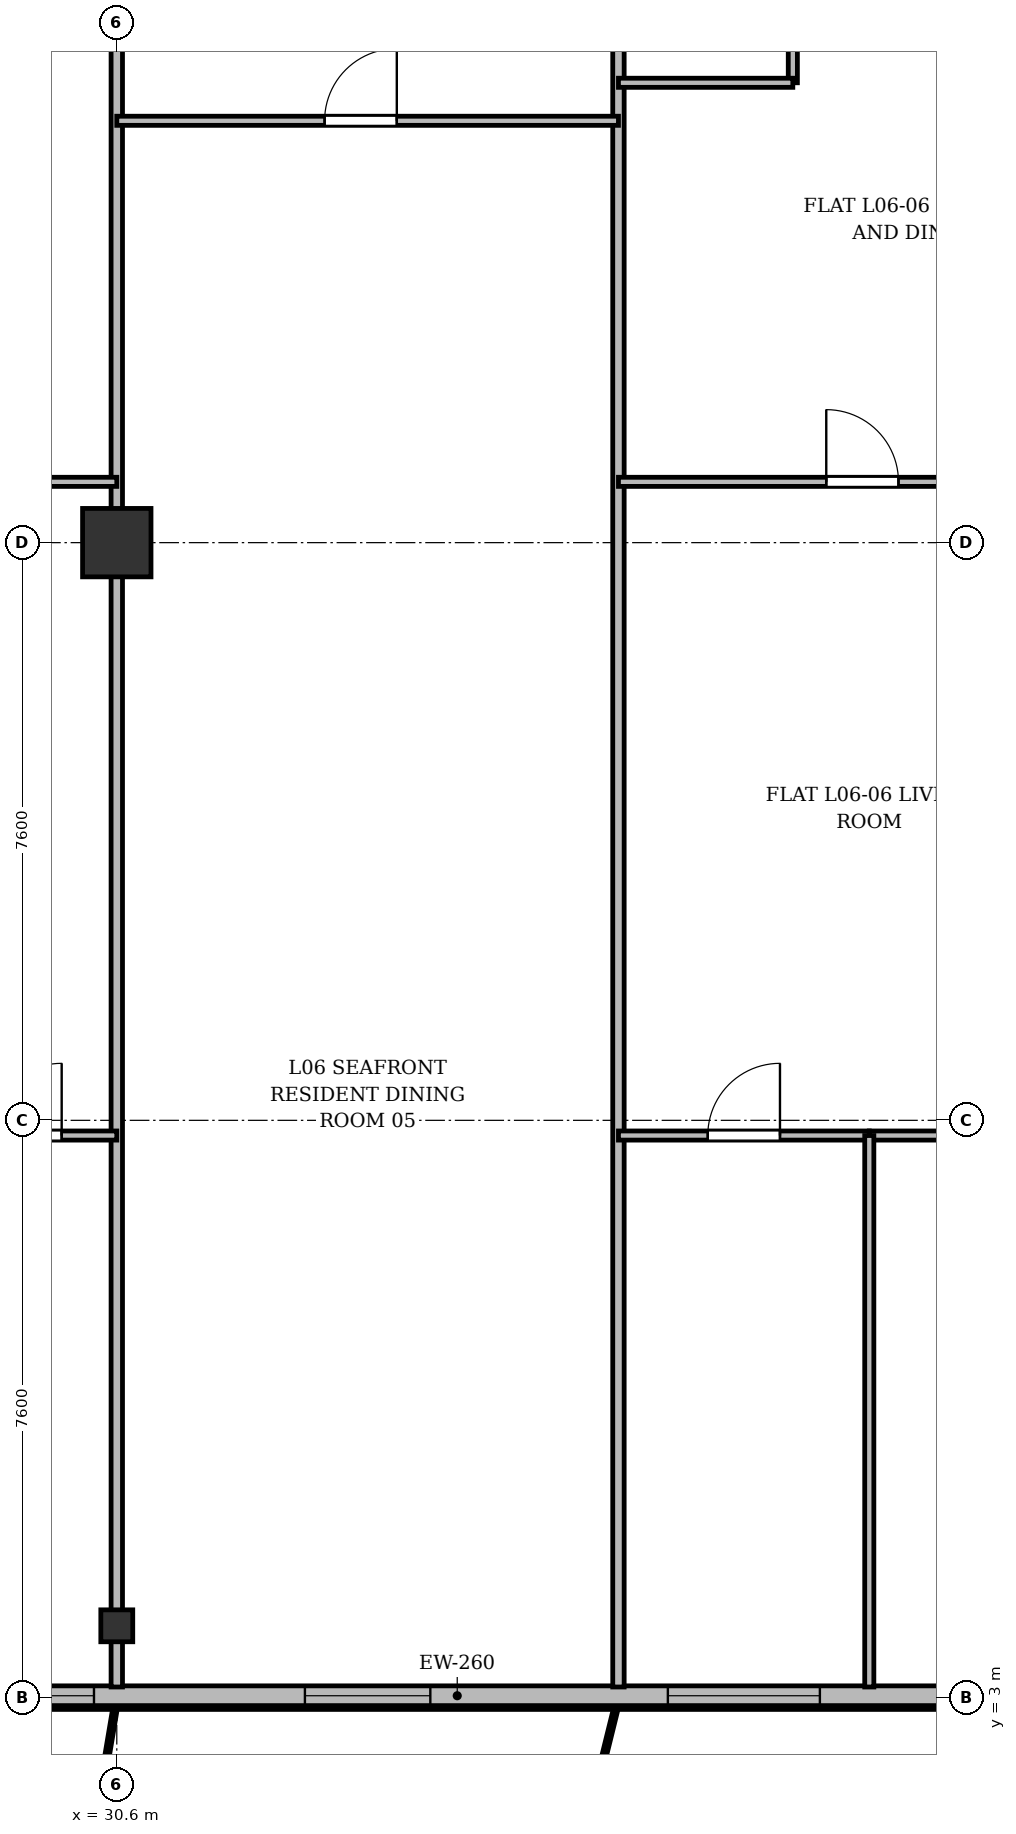
"""IFC4 building model, lengths in metres.
Left out: names, types, materials, properties, quantities, classifications, styles, units other than length and angle.
Written with IfcOpenShell. Run it as: python <this file> out.ifc"""

import sys

from ifc_helpers import new_model, si_unit, direction, frame, frame_2d, origin, origin_2d, place, context, subcontext, project, spatial, rectangle, i_section, extrude, source, transform, mapped, element, fill, save


model = new_model("IFC4")
c1 = context("Model", 3, precision=1e-05, world=origin(), true_north=direction((0.0, 1.0)))
c2 = subcontext(c1, "Body", "Model", "MODEL_VIEW")
j1 = project(units=[si_unit("LENGTHUNIT", "METRE"), si_unit("PLANEANGLEUNIT", "RADIAN")], contexts=[c1])
p1 = place(None, origin())
s1 = spatial("IfcSite", under=j1, at=p1, CompositionType="ELEMENT")
p2 = place(p1, origin())
s2 = spatial("IfcBuilding", under=s1, at=p2, CompositionType="ELEMENT")
p3 = place(p2, frame((0.0, 0.0, 27.1)))
s3 = spatial("IfcBuildingStorey", under=s2, at=p3, CompositionType="ELEMENT", Elevation=27.1)
m1 = source(origin(), c2, "Body", "SweptSolid", [
    extrude(i_section(OverallWidth=0.42, OverallDepth=0.42, WebThickness=0.026, FlangeThickness=0.04, at=origin_2d()), origin(), (0.0, 0.0, 1.0), 3.6),
])
p4 = place(p3, frame((30.6, 3.95, 0.0), z_axis=(0.0, 0.0, 1.0), x_axis=(1.0, 0.0, 0.0)))
e1 = element("IfcColumn", 1, at=p4, inside=s3, PredefinedType="COLUMN", context=c2, shape_type="MappedRepresentation", body=[
    mapped(m1, transform((0.0, 0.0, 0.0), x_axis=(1.0, 0.0, 0.0), y_axis=(0.0, 1.0, 0.0), z_axis=(0.0, 0.0, 1.0), scale=1.0)),
])
m2 = source(origin(), c2, "Body", "SweptSolid", [
    extrude(rectangle(XDim=0.9, YDim=0.9, at=origin_2d()), origin(), (0.0, 0.0, 1.0), 3.6),
])
p5 = place(p3, frame((30.6, 18.2, 0.0), z_axis=(0.0, 0.0, 1.0), x_axis=(1.0, 0.0, 0.0)))
e2 = element("IfcColumn", 2, at=p5, inside=s3, PredefinedType="COLUMN", context=c2, shape_type="MappedRepresentation", body=[
    mapped(m2, transform((0.0, 0.0, 0.0), x_axis=(1.0, 0.0, 0.0), y_axis=(0.0, 1.0, 0.0), z_axis=(0.0, 0.0, 1.0), scale=1.0)),
])
p6 = place(p3, frame((66.9, 3.03, 0.0), z_axis=(0.0, 0.0, 1.0), x_axis=(-1.0, 0.0, 0.0)))
e3 = element("IfcWall", 3, at=p6, inside=s3, PredefinedType="SOLIDWALL", context=c2, shape_type="SweptSolid", body=[
    extrude(rectangle(XDim=59.4, YDim=0.26, at=frame_2d((29.7, 0.0))), origin(), (0.0, 0.0, 1.0), 3.34),
])
p7 = place(p6, frame((3.95, 0.0, 0.9)))
e4 = element("IfcOpeningElement", 4, at=p7, cuts=e3, PredefinedType="OPENING", context=c2, shape_type="SweptSolid", body=[
    extrude(rectangle(XDim=1.5, YDim=1.75, at=frame_2d((0.75, 0.875))), frame((0.0, 0.14, 0.0), z_axis=(0.0, -1.0, 0.0), x_axis=(1.0, 0.0, 0.0)), (0.0, 0.0, 1.0), 0.28),
])
p8 = place(p6, frame((9.05, 0.0, 0.9)))
e5 = element("IfcOpeningElement", 5, at=p8, cuts=e3, PredefinedType="OPENING", context=c2, shape_type="SweptSolid", body=[
    extrude(rectangle(XDim=2.0, YDim=1.95, at=frame_2d((1.0, 0.975))), frame((0.0, 0.14, 0.0), z_axis=(0.0, -1.0, 0.0), x_axis=(1.0, 0.0, 0.0)), (0.0, 0.0, 1.0), 0.28),
])
p9 = place(p6, frame((13.125, 0.0, 0.9)))
e6 = element("IfcOpeningElement", 6, at=p9, cuts=e3, PredefinedType="OPENING", context=c2, shape_type="SweptSolid", body=[
    extrude(rectangle(XDim=1.65, YDim=1.85, at=frame_2d((0.825, 0.925))), frame((0.0, 0.14, 0.0), z_axis=(0.0, -1.0, 0.0), x_axis=(1.0, 0.0, 0.0)), (0.0, 0.0, 1.0), 0.28),
])
p10 = place(p6, frame((17.007, 0.0, 0.0)))
e7 = element("IfcOpeningElement", 7, at=p10, cuts=e3, PredefinedType="OPENING", context=c2, shape_type="SweptSolid", body=[
    extrude(rectangle(XDim=1.2, YDim=2.2, at=frame_2d((0.6, 1.1))), frame((0.0, 0.14, 0.0), z_axis=(0.0, -1.0, 0.0), x_axis=(1.0, 0.0, 0.0)), (0.0, 0.0, 1.0), 0.28),
])
p11 = place(p6, frame((20.2, 0.0, 0.9)))
e8 = element("IfcOpeningElement", 8, at=p11, cuts=e3, PredefinedType="OPENING", context=c2, shape_type="SweptSolid", body=[
    extrude(rectangle(XDim=2.2, YDim=1.8, at=frame_2d((1.1, 0.9))), frame((0.0, 0.14, 0.0), z_axis=(0.0, -1.0, 0.0), x_axis=(1.0, 0.0, 0.0)), (0.0, 0.0, 1.0), 0.28),
])
p12 = place(p6, frame((24.0, 0.0, 0.9)))
e9 = element("IfcOpeningElement", 9, at=p12, cuts=e3, PredefinedType="OPENING", context=c2, shape_type="SweptSolid", body=[
    extrude(rectangle(XDim=1.5, YDim=1.75, at=frame_2d((0.75, 0.875))), frame((0.0, 0.14, 0.0), z_axis=(0.0, -1.0, 0.0), x_axis=(1.0, 0.0, 0.0)), (0.0, 0.0, 1.0), 0.28),
])
p13 = place(p6, frame((27.05, 0.0, 0.9)))
e10 = element("IfcOpeningElement", 10, at=p13, cuts=e3, PredefinedType="OPENING", context=c2, shape_type="SweptSolid", body=[
    extrude(rectangle(XDim=2.0, YDim=1.95, at=frame_2d((1.0, 0.975))), frame((0.0, 0.14, 0.0), z_axis=(0.0, -1.0, 0.0), x_axis=(1.0, 0.0, 0.0)), (0.0, 0.0, 1.0), 0.28),
])
p14 = place(p6, frame((32.175, 0.0, 0.9)))
e11 = element("IfcOpeningElement", 11, at=p14, cuts=e3, PredefinedType="OPENING", context=c2, shape_type="SweptSolid", body=[
    extrude(rectangle(XDim=1.65, YDim=1.85, at=frame_2d((0.825, 0.925))), frame((0.0, 0.14, 0.0), z_axis=(0.0, -1.0, 0.0), x_axis=(1.0, 0.0, 0.0)), (0.0, 0.0, 1.0), 0.28),
])
p15 = place(p6, frame((36.6, 0.0, 0.9)))
e12 = element("IfcOpeningElement", 12, at=p15, cuts=e3, PredefinedType="OPENING", context=c2, shape_type="SweptSolid", body=[
    extrude(rectangle(XDim=1.8, YDim=1.8, at=frame_2d((0.9, 0.9))), frame((0.0, 0.14, 0.0), z_axis=(0.0, -1.0, 0.0), x_axis=(1.0, 0.0, 0.0)), (0.0, 0.0, 1.0), 0.28),
])
p16 = place(p6, frame((39.15, 0.0, 0.9)))
e13 = element("IfcOpeningElement", 13, at=p16, cuts=e3, PredefinedType="OPENING", context=c2, shape_type="SweptSolid", body=[
    extrude(rectangle(XDim=1.5, YDim=1.75, at=frame_2d((0.75, 0.875))), frame((0.0, 0.14, 0.0), z_axis=(0.0, -1.0, 0.0), x_axis=(1.0, 0.0, 0.0)), (0.0, 0.0, 1.0), 0.28),
])
p17 = place(p6, frame((41.55, 0.0, 0.9)))
e14 = element("IfcOpeningElement", 14, at=p17, cuts=e3, PredefinedType="OPENING", context=c2, shape_type="SweptSolid", body=[
    extrude(rectangle(XDim=1.5, YDim=1.75, at=frame_2d((0.75, 0.875))), frame((0.0, 0.14, 0.0), z_axis=(0.0, -1.0, 0.0), x_axis=(1.0, 0.0, 0.0)), (0.0, 0.0, 1.0), 0.28),
])
p18 = place(p6, frame((45.435, 0.0, 0.0)))
e15 = element("IfcOpeningElement", 15, at=p18, cuts=e3, PredefinedType="OPENING", context=c2, shape_type="SweptSolid", body=[
    extrude(rectangle(XDim=1.2, YDim=2.2, at=frame_2d((0.6, 1.1))), frame((0.0, 0.14, 0.0), z_axis=(0.0, -1.0, 0.0), x_axis=(1.0, 0.0, 0.0)), (0.0, 0.0, 1.0), 0.28),
])
p19 = place(p6, frame((48.525, 0.0, 0.9)))
e16 = element("IfcOpeningElement", 16, at=p19, cuts=e3, PredefinedType="OPENING", context=c2, shape_type="SweptSolid", body=[
    extrude(rectangle(XDim=1.65, YDim=1.85, at=frame_2d((0.825, 0.925))), frame((0.0, 0.14, 0.0), z_axis=(0.0, -1.0, 0.0), x_axis=(1.0, 0.0, 0.0)), (0.0, 0.0, 1.0), 0.28),
])
p20 = place(p6, frame((52.1, 0.0, 0.9)))
e17 = element("IfcOpeningElement", 17, at=p20, cuts=e3, PredefinedType="OPENING", context=c2, shape_type="SweptSolid", body=[
    extrude(rectangle(XDim=1.8, YDim=1.8, at=frame_2d((0.9, 0.9))), frame((0.0, 0.14, 0.0), z_axis=(0.0, -1.0, 0.0), x_axis=(1.0, 0.0, 0.0)), (0.0, 0.0, 1.0), 0.28),
])
p21 = place(p6, frame((55.3, 0.0, 0.9)))
e18 = element("IfcOpeningElement", 18, at=p21, cuts=e3, PredefinedType="OPENING", context=c2, shape_type="SweptSolid", body=[
    extrude(rectangle(XDim=2.2, YDim=1.8, at=frame_2d((1.1, 0.9))), frame((0.0, 0.14, 0.0), z_axis=(0.0, -1.0, 0.0), x_axis=(1.0, 0.0, 0.0)), (0.0, 0.0, 1.0), 0.28),
])
p22 = place(p3, frame((30.6, 3.145, 0.0), z_axis=(0.0, 0.0, 1.0), x_axis=(0.0, 1.0, 0.0)))
e19 = element("IfcWall", 19, at=p22, inside=s3, PredefinedType="PARTITIONING", context=c2, shape_type="SweptSolid", body=[
    extrude(rectangle(XDim=24.455, YDim=0.15, at=frame_2d((12.228, 0.0))), origin(), (0.0, 0.0, 1.0), 2.752),
])
p23 = place(p3, frame((37.2, 3.145, 0.0), z_axis=(0.0, 0.0, 1.0), x_axis=(0.0, 1.0, 0.0)))
e20 = element("IfcWall", 20, at=p23, inside=s3, PredefinedType="PARTITIONING", context=c2, shape_type="SweptSolid", body=[
    extrude(rectangle(XDim=24.455, YDim=0.15, at=frame_2d((12.228, 0.0))), origin(), (0.0, 0.0, 1.0), 2.69),
])
p24 = place(p3, frame((23.4, 19.0, 0.0), z_axis=(0.0, 0.0, 1.0), x_axis=(1.0, 0.0, 0.0)))
e21 = element("IfcWall", 21, at=p24, inside=s3, PredefinedType="PARTITIONING", context=c2, shape_type="SweptSolid", body=[
    extrude(rectangle(XDim=7.2, YDim=0.12, at=frame_2d((3.6, 0.0))), origin(), (0.0, 0.0, 1.0), 2.752),
])
p25 = place(p24, frame((3.125, 0.0, 0.0)))
e22 = element("IfcOpeningElement", 22, at=p25, cuts=e21, PredefinedType="OPENING", context=c2, shape_type="SweptSolid", body=[
    extrude(rectangle(XDim=0.95, YDim=2.15, at=frame_2d((0.475, 1.075))), frame((0.0, 0.07, 0.0), z_axis=(0.0, -1.0, 0.0), x_axis=(1.0, 0.0, 0.0)), (0.0, 0.0, 1.0), 0.14),
])
p26 = place(p3, frame((28.2, 10.4, 0.0), z_axis=(0.0, 0.0, 1.0), x_axis=(1.0, 0.0, 0.0)))
e23 = element("IfcWall", 23, at=p26, inside=s3, PredefinedType="PARTITIONING", context=c2, shape_type="SweptSolid", body=[
    extrude(rectangle(XDim=2.4, YDim=0.12, at=frame_2d((1.2, 0.0))), origin(), (0.0, 0.0, 1.0), 2.752),
])
p27 = place(p26, frame((0.725, 0.0, 0.0)))
e24 = element("IfcOpeningElement", 24, at=p27, cuts=e23, PredefinedType="OPENING", context=c2, shape_type="SweptSolid", body=[
    extrude(rectangle(XDim=0.95, YDim=2.15, at=frame_2d((0.475, 1.075))), frame((0.0, 0.07, 0.0), z_axis=(0.0, -1.0, 0.0), x_axis=(1.0, 0.0, 0.0)), (0.0, 0.0, 1.0), 0.14),
])
p28 = place(p3, frame((30.6, 23.75, 0.0), z_axis=(0.0, 0.0, 1.0), x_axis=(1.0, 0.0, 0.0)))
e25 = element("IfcWall", 25, at=p28, inside=s3, PredefinedType="PARTITIONING", context=c2, shape_type="SweptSolid", body=[
    extrude(rectangle(XDim=6.6, YDim=0.12, at=frame_2d((3.3, 0.0))), origin(), (0.0, 0.0, 1.0), 2.752),
])
p29 = place(p28, frame((2.734, 0.0, 0.0)))
e26 = element("IfcOpeningElement", 26, at=p29, cuts=e25, PredefinedType="OPENING", context=c2, shape_type="SweptSolid", body=[
    extrude(rectangle(XDim=0.95, YDim=2.15, at=frame_2d((0.475, 1.075))), frame((0.0, 0.07, 0.0), z_axis=(0.0, -1.0, 0.0), x_axis=(1.0, 0.0, 0.0)), (0.0, 0.0, 1.0), 0.14),
])
p30 = place(p3, frame((37.2, 19.0, 0.0), z_axis=(0.0, 0.0, 1.0), x_axis=(1.0, 0.0, 0.0)))
e27 = element("IfcWall", 27, at=p30, inside=s3, PredefinedType="PARTITIONING", context=c2, shape_type="SweptSolid", body=[
    extrude(rectangle(XDim=6.6, YDim=0.12, at=frame_2d((3.3, 0.0))), origin(), (0.0, 0.0, 1.0), 2.752),
])
p31 = place(p30, frame((2.734, 0.0, 0.0)))
e28 = element("IfcOpeningElement", 28, at=p31, cuts=e27, PredefinedType="OPENING", context=c2, shape_type="SweptSolid", body=[
    extrude(rectangle(XDim=0.95, YDim=2.15, at=frame_2d((0.475, 1.075))), frame((0.0, 0.07, 0.0), z_axis=(0.0, -1.0, 0.0), x_axis=(1.0, 0.0, 0.0)), (0.0, 0.0, 1.0), 0.14),
])
p32 = place(p3, frame((39.494, 24.25, 0.0), z_axis=(0.0, 0.0, 1.0), x_axis=(0.0, 1.0, 0.0)))
e29 = element("IfcWall", 29, at=p32, inside=s3, PredefinedType="PARTITIONING", context=c2, shape_type="SweptSolid", body=[
    extrude(rectangle(XDim=3.35, YDim=0.12, at=frame_2d((1.675, 0.0))), origin(), (0.0, 0.0, 1.0), 2.94),
])
p33 = place(p32, frame((0.8, 0.0, 0.0)))
e30 = element("IfcOpeningElement", 30, at=p33, cuts=e29, PredefinedType="OPENING", context=c2, shape_type="SweptSolid", body=[
    extrude(rectangle(XDim=0.85, YDim=2.1, at=frame_2d((0.425, 1.05))), frame((0.0, 0.07, 0.0), z_axis=(0.0, -1.0, 0.0), x_axis=(1.0, 0.0, 0.0)), (0.0, 0.0, 1.0), 0.14),
])
p34 = place(p3, frame((37.2, 24.25, 0.0), z_axis=(0.0, 0.0, 1.0), x_axis=(1.0, 0.0, 0.0)))
e31 = element("IfcWall", 31, at=p34, inside=s3, PredefinedType="PARTITIONING", context=c2, shape_type="SweptSolid", body=[
    extrude(rectangle(XDim=2.294, YDim=0.12, at=frame_2d((1.147, 0.0))), origin(), (0.0, 0.0, 1.0), 3.34),
])
p35 = place(p3, frame((37.2, 10.4, 0.0), z_axis=(0.0, 0.0, 1.0), x_axis=(1.0, 0.0, 0.0)))
e32 = element("IfcWall", 32, at=p35, inside=s3, PredefinedType="PARTITIONING", context=c2, shape_type="SweptSolid", body=[
    extrude(rectangle(XDim=3.3, YDim=0.12, at=frame_2d((1.65, 0.0))), origin(), (0.0, 0.0, 1.0), 3.34),
])
p36 = place(p35, frame((1.175, 0.0, 0.0)))
e33 = element("IfcOpeningElement", 33, at=p36, cuts=e32, PredefinedType="OPENING", context=c2, shape_type="SweptSolid", body=[
    extrude(rectangle(XDim=0.95, YDim=2.15, at=frame_2d((0.475, 1.075))), frame((0.0, 0.07, 0.0), z_axis=(0.0, -1.0, 0.0), x_axis=(1.0, 0.0, 0.0)), (0.0, 0.0, 1.0), 0.14),
])
p37 = place(p3, frame((40.5, 10.4, 0.0), z_axis=(0.0, 0.0, 1.0), x_axis=(1.0, 0.0, 0.0)))
e34 = element("IfcWall", 34, at=p37, inside=s3, PredefinedType="PARTITIONING", context=c2, shape_type="SweptSolid", body=[
    extrude(rectangle(XDim=3.3, YDim=0.12, at=frame_2d((1.65, 0.0))), origin(), (0.0, 0.0, 1.0), 2.752),
])
p38 = place(p37, frame((1.175, 0.0, 0.0)))
e35 = element("IfcOpeningElement", 35, at=p38, cuts=e34, PredefinedType="OPENING", context=c2, shape_type="SweptSolid", body=[
    extrude(rectangle(XDim=0.95, YDim=2.15, at=frame_2d((0.475, 1.075))), frame((0.0, 0.07, 0.0), z_axis=(0.0, -1.0, 0.0), x_axis=(1.0, 0.0, 0.0)), (0.0, 0.0, 1.0), 0.14),
])
p39 = place(p3, frame((40.5, 3.145, 0.0), z_axis=(0.0, 0.0, 1.0), x_axis=(0.0, 1.0, 0.0)))
e36 = element("IfcWall", 36, at=p39, inside=s3, PredefinedType="PARTITIONING", context=c2, shape_type="SweptSolid", body=[
    extrude(rectangle(XDim=7.255, YDim=0.12, at=frame_2d((3.627, 0.0))), origin(), (0.0, 0.0, 1.0), 2.69),
])
m3 = source(origin(), c2, "Body", "SweptSolid", [
    extrude(rectangle(XDim=2.0, YDim=1.95, at=frame_2d((1.0, 0.975))), frame((0.0, 0.03, 0.0), z_axis=(0.0, -1.0, 0.0), x_axis=(1.0, 0.0, 0.0)), (0.0, 0.0, 1.0), 0.06),
])
p40 = place(p13, origin())
e37 = element("IfcWindow", 37, at=p40, inside=s3, PartitioningType="SINGLE_PANEL", PredefinedType="WINDOW", context=c2, shape_type="MappedRepresentation", body=[
    mapped(m3, transform((0.0, 0.0, 0.0), x_axis=(1.0, 0.0, 0.0), y_axis=(0.0, 1.0, 0.0), z_axis=(0.0, 0.0, 1.0), scale=1.0)),
])
fill(e10, e37)
m4 = source(origin(), c2, "Body", "SweptSolid", [
    extrude(rectangle(XDim=1.65, YDim=1.85, at=frame_2d((0.825, 0.925))), frame((0.0, 0.03, 0.0), z_axis=(0.0, -1.0, 0.0), x_axis=(1.0, 0.0, 0.0)), (0.0, 0.0, 1.0), 0.06),
])
p41 = place(p14, origin())
e38 = element("IfcWindow", 38, at=p41, inside=s3, PartitioningType="SINGLE_PANEL", PredefinedType="WINDOW", context=c2, shape_type="MappedRepresentation", body=[
    mapped(m4, transform((0.0, 0.0, 0.0), x_axis=(1.0, 0.0, 0.0), y_axis=(0.0, 1.0, 0.0), z_axis=(0.0, 0.0, 1.0), scale=1.0)),
])
fill(e11, e38)
m5 = source(origin(), c2, "Body", "SweptSolid", [
    extrude(rectangle(XDim=1.8, YDim=1.8, at=frame_2d((0.9, 0.9))), frame((0.0, 0.03, 0.0), z_axis=(0.0, -1.0, 0.0), x_axis=(1.0, 0.0, 0.0)), (0.0, 0.0, 1.0), 0.06),
])
p42 = place(p15, origin())
e39 = element("IfcWindow", 39, at=p42, inside=s3, PartitioningType="SINGLE_PANEL", PredefinedType="WINDOW", context=c2, shape_type="MappedRepresentation", body=[
    mapped(m5, transform((0.0, 0.0, 0.0), x_axis=(1.0, 0.0, 0.0), y_axis=(0.0, 1.0, 0.0), z_axis=(0.0, 0.0, 1.0), scale=1.0)),
])
fill(e12, e39)
m6 = source(origin(), c2, "Body", "SweptSolid", [
    extrude(rectangle(XDim=0.95, YDim=2.15, at=frame_2d((0.475, 1.075))), frame((0.0, 0.025, 0.0), z_axis=(0.0, -1.0, 0.0), x_axis=(1.0, 0.0, 0.0)), (0.0, 0.0, 1.0), 0.05),
])
p43 = place(p27, origin())
e40 = element("IfcDoor", 40, at=p43, inside=s3, OperationType="SINGLE_SWING_RIGHT", PredefinedType="DOOR", context=c2, shape_type="MappedRepresentation", body=[
    mapped(m6, transform((0.0, 0.0, 0.0), x_axis=(1.0, 0.0, 0.0), y_axis=(0.0, 1.0, 0.0), z_axis=(0.0, 0.0, 1.0), scale=1.0)),
])
fill(e24, e40)
p44 = place(p29, origin())
e41 = element("IfcDoor", 41, at=p44, inside=s3, OperationType="SINGLE_SWING_RIGHT", PredefinedType="DOOR", context=c2, shape_type="MappedRepresentation", body=[
    mapped(m6, transform((0.0, 0.0, 0.0), x_axis=(1.0, 0.0, 0.0), y_axis=(0.0, 1.0, 0.0), z_axis=(0.0, 0.0, 1.0), scale=1.0)),
])
fill(e26, e41)
p45 = place(p31, origin())
e42 = element("IfcDoor", 42, at=p45, inside=s3, OperationType="SINGLE_SWING_LEFT", PredefinedType="DOOR", context=c2, shape_type="MappedRepresentation", body=[
    mapped(m6, transform((0.0, 0.0, 0.0), x_axis=(1.0, 0.0, 0.0), y_axis=(0.0, 1.0, 0.0), z_axis=(0.0, 0.0, 1.0), scale=1.0)),
])
fill(e28, e42)
p46 = place(p36, origin())
e43 = element("IfcDoor", 43, at=p46, inside=s3, OperationType="SINGLE_SWING_RIGHT", PredefinedType="DOOR", context=c2, shape_type="MappedRepresentation", body=[
    mapped(m6, transform((0.0, 0.0, 0.0), x_axis=(1.0, 0.0, 0.0), y_axis=(0.0, 1.0, 0.0), z_axis=(0.0, 0.0, 1.0), scale=1.0)),
])
fill(e33, e43)
save(model, sys.argv[1])
